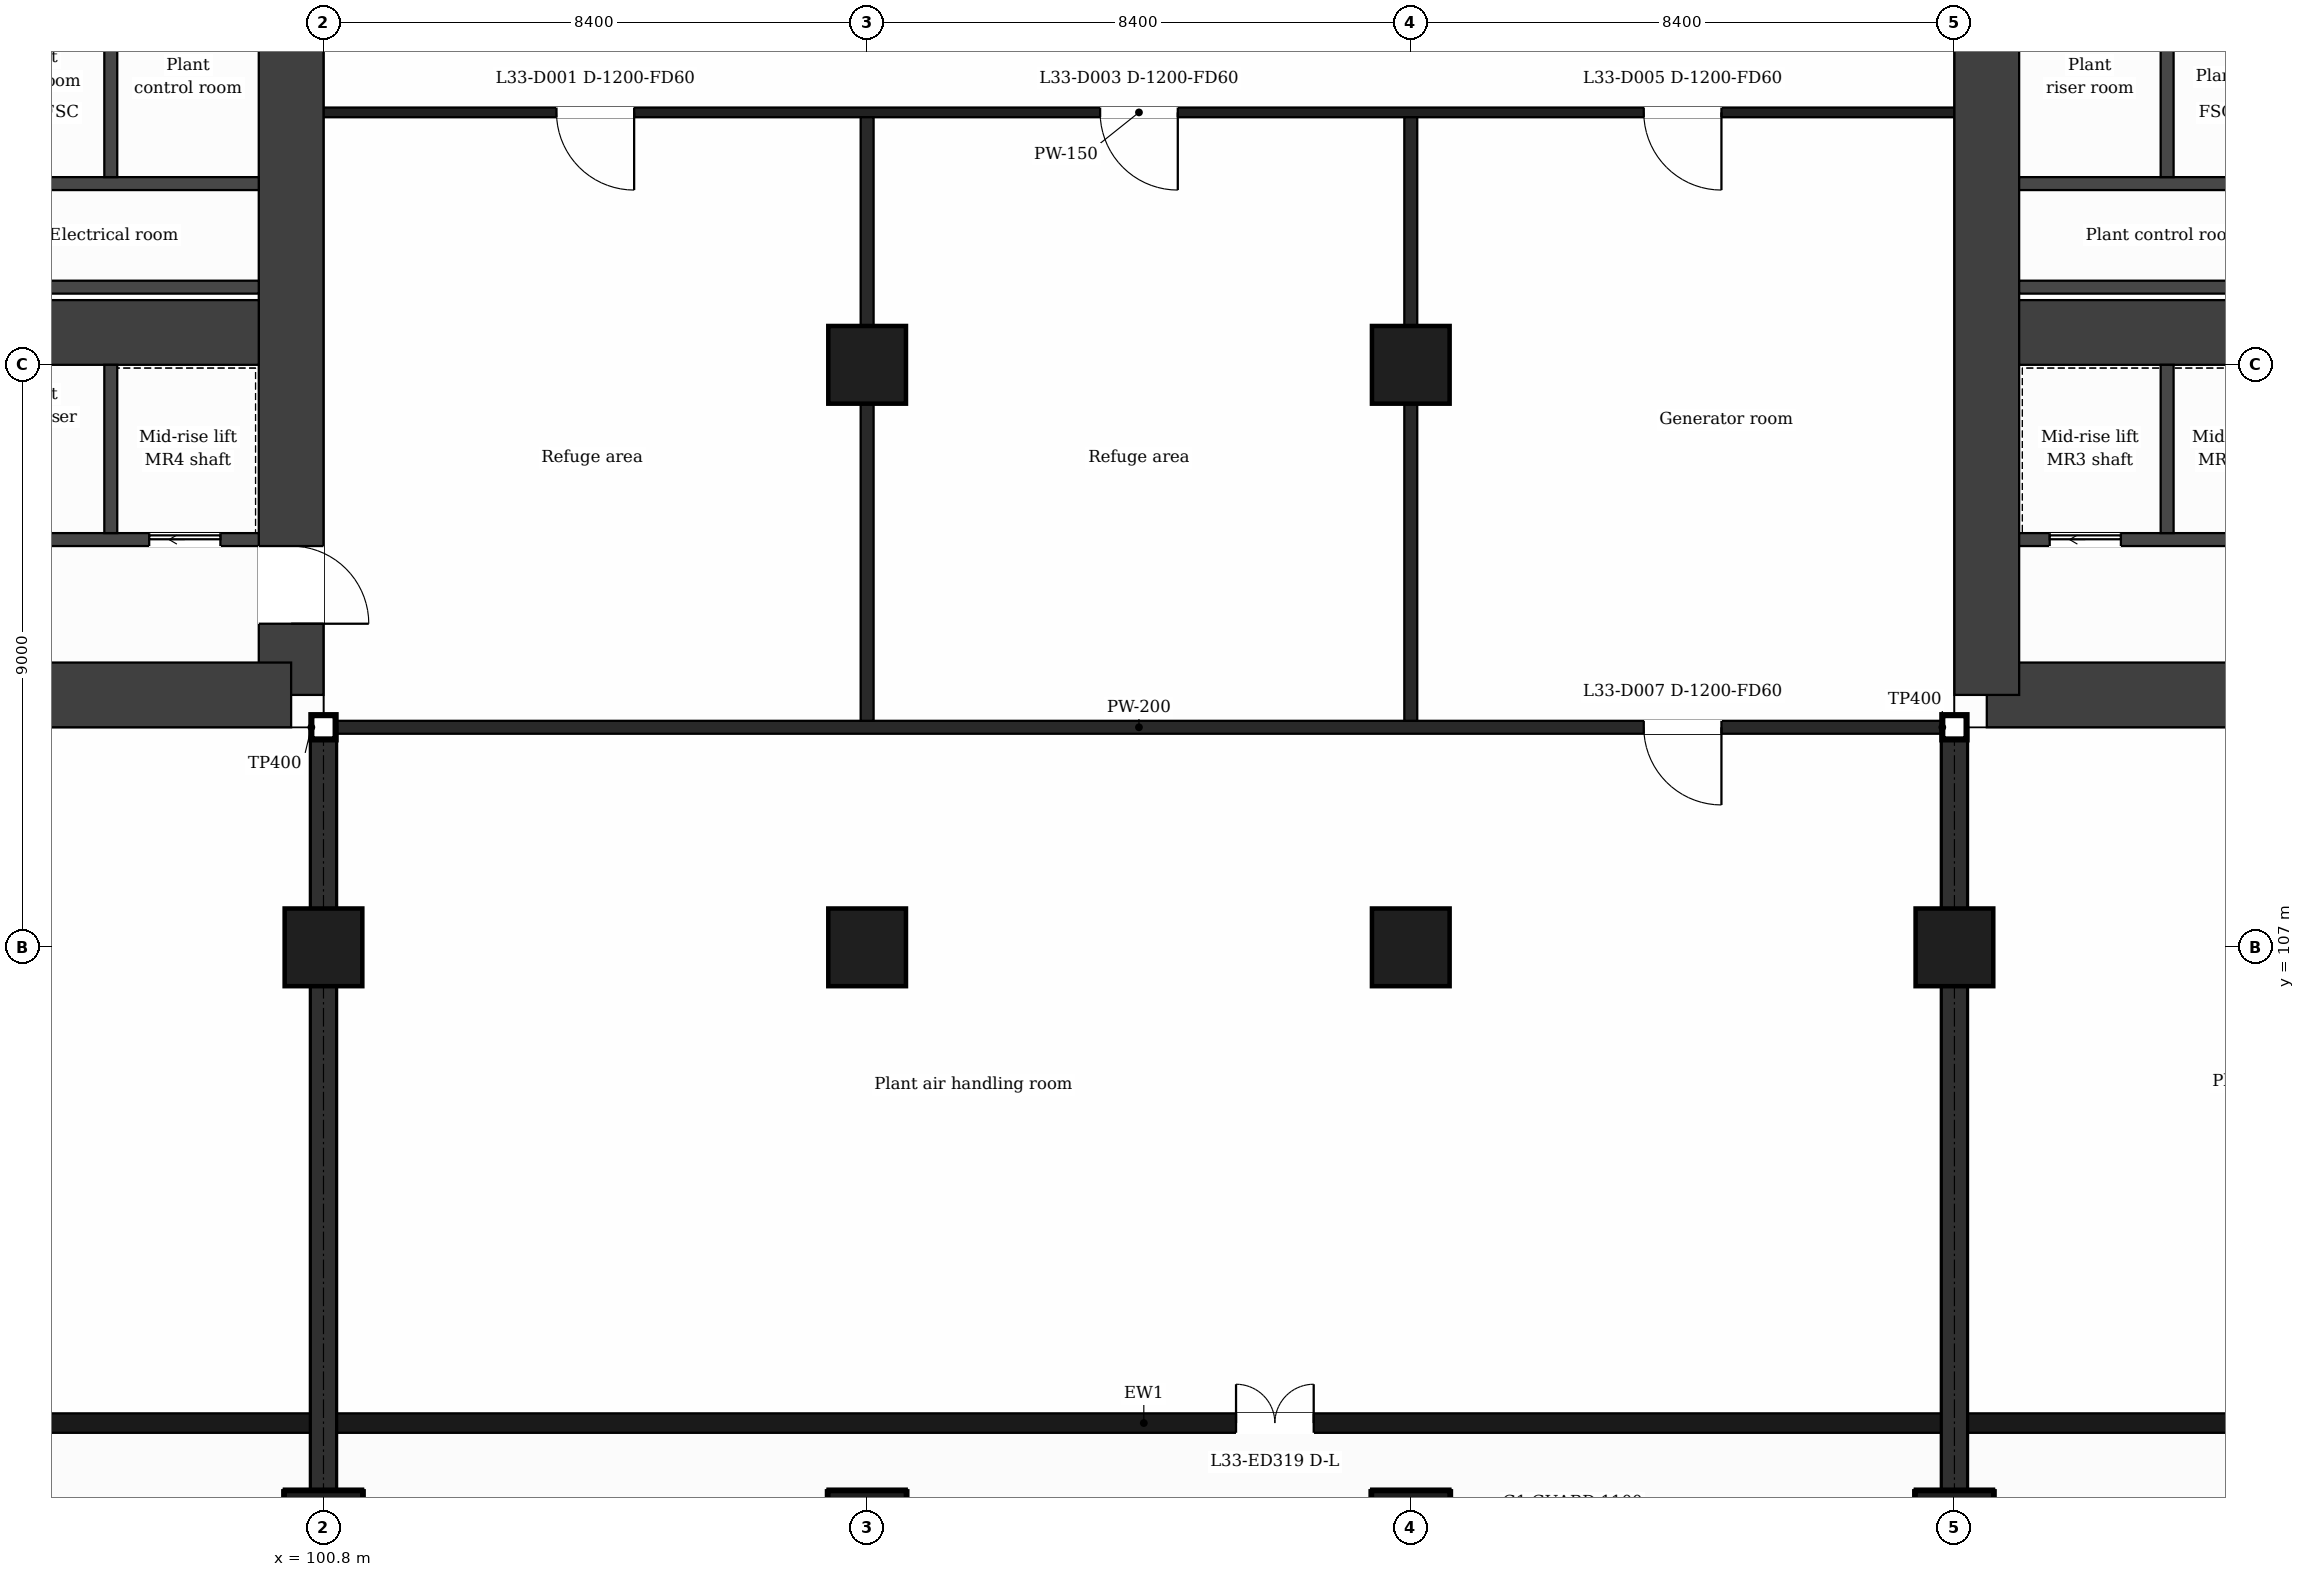
"""IFC4 building model, lengths in metres.
Left out: names, types, materials, properties, quantities, classifications, styles, units other than length and angle.
Written with IfcOpenShell. Run it as: python <this file> out.ifc"""

import sys

from ifc_helpers import new_model, si_unit, direction, frame, frame_2d, origin, origin_2d, place, context, subcontext, project, spatial, rectangle, extrude, element, fill, save


model = new_model("IFC4")
c1 = context("Model", 3, precision=1e-05, world=origin(), true_north=direction((0.0, 1.0)))
c2 = subcontext(c1, "Body", "Model", "MODEL_VIEW")
j1 = project(units=[si_unit("LENGTHUNIT", "METRE"), si_unit("PLANEANGLEUNIT", "RADIAN")], contexts=[c1])
p1 = place(None, origin())
s1 = spatial("IfcSite", under=j1, at=p1, CompositionType="ELEMENT")
p2 = place(p1, origin())
s2 = spatial("IfcBuilding", under=s1, at=p2, CompositionType="ELEMENT")
p3 = place(p2, frame((0.0, 0.0, 142.8)))
s3 = spatial("IfcBuildingStorey", under=s2, at=p3, CompositionType="ELEMENT", Elevation=142.8)
p4 = place(p3, frame((100.3, 131.9, 0.0), z_axis=(0.0, 0.0, 1.0), x_axis=(0.0, -1.0, 0.0)))
e1 = element("IfcWall", 1, at=p4, inside=s3, PredefinedType="SHEAR", context=c2, shape_type="SweptSolid", body=[
    extrude(rectangle(XDim=21.0, YDim=1.0, at=frame_2d((10.5, 0.0))), origin(), (0.0, 0.0, 1.0), 5.0),
])
p5 = place(p4, frame((18.7, 0.0, 0.0)))
e2 = element("IfcOpeningElement", 2, at=p5, cuts=e1, PredefinedType="OPENING", context=c2, shape_type="SweptSolid", body=[
    extrude(rectangle(XDim=1.2, YDim=2.1, at=frame_2d((0.6, 1.05))), frame((0.0, 0.51, 0.0), z_axis=(0.0, -1.0, 0.0), x_axis=(1.0, 0.0, 0.0)), (0.0, 0.0, 1.0), 1.02),
])
p6 = place(p4, frame((7.75, 0.0, 0.0)))
e3 = element("IfcOpeningElement", 3, at=p6, cuts=e1, PredefinedType="OPENING", context=c2, shape_type="SweptSolid", body=[
    extrude(rectangle(XDim=1.4, YDim=2.1, at=frame_2d((0.7, 1.05))), frame((0.0, 0.51, 0.0), z_axis=(0.0, -1.0, 0.0), x_axis=(1.0, 0.0, 0.0)), (0.0, 0.0, 1.0), 1.02),
])
p7 = place(p3, frame((100.3, 110.9, 0.0), z_axis=(0.0, 0.0, 1.0), x_axis=(-1.0, 0.0, 0.0)))
e4 = element("IfcWall", 4, at=p7, inside=s3, PredefinedType="SHEAR", context=c2, shape_type="SweptSolid", body=[
    extrude(rectangle(XDim=14.059, YDim=1.0, at=frame_2d((7.03, 0.0))), origin(), (0.0, 0.0, 1.0), 5.0),
])
p8 = place(p7, frame((5.802, 0.0, 0.0)))
e5 = element("IfcOpeningElement", 5, at=p8, cuts=e4, PredefinedType="OPENING", context=c2, shape_type="SweptSolid", body=[
    extrude(rectangle(XDim=1.4, YDim=2.1, at=frame_2d((0.7, 1.05))), frame((0.0, 0.51, 0.0), z_axis=(0.0, -1.0, 0.0), x_axis=(1.0, 0.0, 0.0)), (0.0, 0.0, 1.0), 1.02),
])
p9 = place(p3, frame((94.9, 116.5, 0.0), z_axis=(0.0, 0.0, 1.0), x_axis=(1.0, 0.0, 0.0)))
e6 = element("IfcWall", 6, at=p9, inside=s3, PredefinedType="SHEAR", context=c2, shape_type="SweptSolid", body=[
    extrude(rectangle(XDim=4.9, YDim=1.0, at=frame_2d((2.45, 0.0))), origin(), (0.0, 0.0, 1.0), 5.0),
])
p10 = place(p3, frame((140.559, 110.9, 0.0), z_axis=(0.0, 0.0, 1.0), x_axis=(-1.0, 0.0, 0.0)))
e7 = element("IfcWall", 7, at=p10, inside=s3, PredefinedType="SHEAR", context=c2, shape_type="SweptSolid", body=[
    extrude(rectangle(XDim=14.059, YDim=1.0, at=frame_2d((7.029, 0.0))), origin(), (0.0, 0.0, 1.0), 5.0),
])
p11 = place(p10, frame((6.858, 0.0, 0.0)))
e8 = element("IfcOpeningElement", 8, at=p11, cuts=e7, PredefinedType="OPENING", context=c2, shape_type="SweptSolid", body=[
    extrude(rectangle(XDim=1.4, YDim=2.1, at=frame_2d((0.7, 1.05))), frame((0.0, 0.51, 0.0), z_axis=(0.0, -1.0, 0.0), x_axis=(1.0, 0.0, 0.0)), (0.0, 0.0, 1.0), 1.02),
])
p12 = place(p3, frame((126.5, 110.9, 0.0), z_axis=(0.0, 0.0, 1.0), x_axis=(0.0, 1.0, 0.0)))
e9 = element("IfcWall", 9, at=p12, inside=s3, PredefinedType="SHEAR", context=c2, shape_type="SweptSolid", body=[
    extrude(rectangle(XDim=21.0, YDim=1.0, at=frame_2d((10.5, 0.0))), origin(), (0.0, 0.0, 1.0), 5.0),
])
p13 = place(p12, frame((17.5, 0.0, 0.0)))
e10 = element("IfcOpeningElement", 10, at=p13, cuts=e9, PredefinedType="OPENING", context=c2, shape_type="SweptSolid", body=[
    extrude(rectangle(XDim=1.2, YDim=2.1, at=frame_2d((0.6, 1.05))), frame((0.0, 0.51, 0.0), z_axis=(0.0, -1.0, 0.0), x_axis=(1.0, 0.0, 0.0)), (0.0, 0.0, 1.0), 1.02),
])
p14 = place(p12, frame((11.85, 0.0, 0.0)))
e11 = element("IfcOpeningElement", 11, at=p14, cuts=e9, PredefinedType="OPENING", context=c2, shape_type="SweptSolid", body=[
    extrude(rectangle(XDim=1.4, YDim=2.1, at=frame_2d((0.7, 1.05))), frame((0.0, 0.51, 0.0), z_axis=(0.0, -1.0, 0.0), x_axis=(1.0, 0.0, 0.0)), (0.0, 0.0, 1.0), 1.02),
])
p15 = place(p3, frame((127.0, 116.5, 0.0), z_axis=(0.0, 0.0, 1.0), x_axis=(1.0, 0.0, 0.0)))
e12 = element("IfcWall", 12, at=p15, inside=s3, PredefinedType="SHEAR", context=c2, shape_type="SweptSolid", body=[
    extrude(rectangle(XDim=4.9, YDim=1.0, at=frame_2d((2.45, 0.0))), origin(), (0.0, 0.0, 1.0), 5.0),
])
for number, where, z_axis, x_axis in (
    (13, (100.8, 98.0, 0.0), (0.0, 0.0, 1.0), (1.0, 0.0, 0.0)),
    (14, (109.2, 98.0, 0.0), (0.0, 0.0, 1.0), (1.0, 0.0, 0.0)),
    (15, (117.6, 98.0, 0.0), (0.0, 0.0, 1.0), (1.0, 0.0, 0.0)),
    (16, (126.0, 98.0, 0.0), (0.0, 0.0, 1.0), (1.0, 0.0, 0.0)),
    (17, (100.8, 107.0, 0.0), (0.0, 0.0, 1.0), (1.0, 0.0, 0.0)),
    (18, (109.2, 107.0, 0.0), (0.0, 0.0, 1.0), (1.0, 0.0, 0.0)),
    (19, (117.6, 107.0, 0.0), (0.0, 0.0, 1.0), (1.0, 0.0, 0.0)),
    (20, (126.0, 107.0, 0.0), (0.0, 0.0, 1.0), (1.0, 0.0, 0.0)),
    (21, (109.2, 116.0, 0.0), (0.0, 0.0, 1.0), (1.0, 0.0, 0.0)),
    (22, (117.6, 116.0, 0.0), (0.0, 0.0, 1.0), (1.0, 0.0, 0.0)),
):
    element("IfcColumn", number, at=place(p3, frame(where, z_axis=z_axis, x_axis=x_axis)), inside=s3, PredefinedType="COLUMN", context=c2, shape_type="SweptSolid", body=[
        extrude(rectangle(XDim=1.2, YDim=1.2, at=origin_2d()), origin(), (0.0, 0.0, 1.0), 5.0),
    ])
p16 = place(p3, frame((89.85, 99.65, 0.0), z_axis=(0.0, 0.0, 1.0), x_axis=(1.0, 0.0, 0.0)))
e23 = element("IfcWall", 23, at=p16, inside=s3, PredefinedType="SOLIDWALL", context=c2, shape_type="SweptSolid", body=[
    extrude(rectangle(XDim=47.25, YDim=0.3, at=frame_2d((23.625, 0.0))), origin(), (0.0, 0.0, 1.0), 4.68),
])
p17 = place(p16, frame((25.05, 0.0, 0.0)))
e24 = element("IfcOpeningElement", 24, at=p17, cuts=e23, PredefinedType="OPENING", context=c2, shape_type="SweptSolid", body=[
    extrude(rectangle(XDim=1.2, YDim=2.4, at=frame_2d((0.6, 1.2))), frame((0.0, 0.16, 0.0), z_axis=(0.0, -1.0, 0.0), x_axis=(1.0, 0.0, 0.0)), (0.0, 0.0, 1.0), 0.32),
])
p18 = place(p3, frame((100.7, 110.4, 0.0), z_axis=(0.0, 0.0, 1.0), x_axis=(1.0, 0.0, 0.0)))
e25 = element("IfcWall", 25, at=p18, inside=s3, PredefinedType="PARTITIONING", context=c2, shape_type="SweptSolid", body=[
    extrude(rectangle(XDim=25.4, YDim=0.2, at=frame_2d((12.7, 0.0))), origin(), (0.0, 0.0, 1.0), 4.68),
])
p19 = place(p18, frame((20.5, 0.0, 0.0)))
e26 = element("IfcOpeningElement", 26, at=p19, cuts=e25, PredefinedType="OPENING", context=c2, shape_type="SweptSolid", body=[
    extrude(rectangle(XDim=1.2, YDim=2.1, at=frame_2d((0.6, 1.05))), frame((0.0, 0.11, 0.0), z_axis=(0.0, -1.0, 0.0), x_axis=(1.0, 0.0, 0.0)), (0.0, 0.0, 1.0), 0.22),
])
p20 = place(p3, frame((95.127, 113.3, 0.0), z_axis=(0.0, 0.0, 1.0), x_axis=(1.0, 0.0, 0.0)))
e27 = element("IfcWall", 27, at=p20, inside=s3, PredefinedType="PARTITIONING", context=c2, shape_type="SweptSolid", body=[
    extrude(rectangle(XDim=4.673, YDim=0.2, at=frame_2d((2.336, 0.0))), origin(), (0.0, 0.0, 1.0), 4.68),
])
p21 = place(p20, frame((2.98, 0.0, 0.0)))
e28 = element("IfcOpeningElement", 28, at=p21, cuts=e27, PredefinedType="OPENING", context=c2, shape_type="SweptSolid", body=[
    extrude(rectangle(XDim=1.1, YDim=2.1, at=frame_2d((0.55, 1.05))), frame((0.0, 0.11, 0.0), z_axis=(0.0, -1.0, 0.0), x_axis=(1.0, 0.0, 0.0)), (0.0, 0.0, 1.0), 0.22),
])
p22 = place(p3, frame((127.0, 113.3, 0.0), z_axis=(0.0, 0.0, 1.0), x_axis=(1.0, 0.0, 0.0)))
e29 = element("IfcWall", 29, at=p22, inside=s3, PredefinedType="PARTITIONING", context=c2, shape_type="SweptSolid", body=[
    extrude(rectangle(XDim=4.673, YDim=0.2, at=frame_2d((2.336, 0.0))), origin(), (0.0, 0.0, 1.0), 4.68),
])
p23 = place(p22, frame((0.472, 0.0, 0.0)))
e30 = element("IfcOpeningElement", 30, at=p23, cuts=e29, PredefinedType="OPENING", context=c2, shape_type="SweptSolid", body=[
    extrude(rectangle(XDim=1.1, YDim=2.1, at=frame_2d((0.55, 1.05))), frame((0.0, 0.11, 0.0), z_axis=(0.0, -1.0, 0.0), x_axis=(1.0, 0.0, 0.0)), (0.0, 0.0, 1.0), 0.22),
])
for number, where, z_axis, x_axis in (
    (31, (95.227, 117.2, 0.0), (0.0, 0.0, 1.0), (1.0, 0.0, 0.0)),
    (32, (127.0, 117.2, 0.0), (0.0, 0.0, 1.0), (1.0, 0.0, 0.0)),
    (33, (95.227, 118.8, 0.0), (0.0, 0.0, 1.0), (1.0, 0.0, 0.0)),
    (34, (127.0, 118.8, 0.0), (0.0, 0.0, 1.0), (1.0, 0.0, 0.0)),
):
    element("IfcWall", number, at=place(p3, frame(where, z_axis=z_axis, x_axis=x_axis)), inside=s3, PredefinedType="PARTITIONING", context=c2, shape_type="SweptSolid", body=[
        extrude(rectangle(XDim=4.573, YDim=0.2, at=frame_2d((2.287, 0.0))), origin(), (0.0, 0.0, 1.0), 4.68),
    ])
p24 = place(p3, frame((100.8, 119.9, 0.0), z_axis=(0.0, 0.0, 1.0), x_axis=(1.0, 0.0, 0.0)))
e35 = element("IfcWall", 35, at=p24, inside=s3, PredefinedType="PARTITIONING", context=c2, shape_type="SweptSolid", body=[
    extrude(rectangle(XDim=25.2, YDim=0.15, at=frame_2d((12.6, 0.0))), origin(), (0.0, 0.0, 1.0), 4.68),
])
p25 = place(p24, frame((3.6, 0.0, 0.0)))
e36 = element("IfcOpeningElement", 36, at=p25, cuts=e35, PredefinedType="OPENING", context=c2, shape_type="SweptSolid", body=[
    extrude(rectangle(XDim=1.2, YDim=2.1, at=frame_2d((0.6, 1.05))), frame((0.0, 0.085, 0.0), z_axis=(0.0, -1.0, 0.0), x_axis=(1.0, 0.0, 0.0)), (0.0, 0.0, 1.0), 0.17),
])
p26 = place(p24, frame((12.0, 0.0, 0.0)))
e37 = element("IfcOpeningElement", 37, at=p26, cuts=e35, PredefinedType="OPENING", context=c2, shape_type="SweptSolid", body=[
    extrude(rectangle(XDim=1.2, YDim=2.1, at=frame_2d((0.6, 1.05))), frame((0.0, 0.085, 0.0), z_axis=(0.0, -1.0, 0.0), x_axis=(1.0, 0.0, 0.0)), (0.0, 0.0, 1.0), 0.17),
])
p27 = place(p24, frame((20.4, 0.0, 0.0)))
e38 = element("IfcOpeningElement", 38, at=p27, cuts=e35, PredefinedType="OPENING", context=c2, shape_type="SweptSolid", body=[
    extrude(rectangle(XDim=1.2, YDim=2.1, at=frame_2d((0.6, 1.05))), frame((0.0, 0.085, 0.0), z_axis=(0.0, -1.0, 0.0), x_axis=(1.0, 0.0, 0.0)), (0.0, 0.0, 1.0), 0.17),
])
p28 = place(p3, frame((97.513, 113.4, 0.0), z_axis=(0.0, 0.0, 1.0), x_axis=(0.0, 1.0, 0.0)))
e39 = element("IfcWall", 39, at=p28, inside=s3, PredefinedType="PARTITIONING", context=c2, shape_type="SweptSolid", body=[
    extrude(rectangle(XDim=2.6, YDim=0.2, at=frame_2d((1.3, 0.0))), origin(), (0.0, 0.0, 1.0), 4.68),
])
p29 = place(p3, frame((97.513, 118.9, 0.0), z_axis=(0.0, 0.0, 1.0), x_axis=(0.0, 1.0, 0.0)))
e40 = element("IfcWall", 40, at=p29, inside=s3, PredefinedType="PARTITIONING", context=c2, shape_type="SweptSolid", body=[
    extrude(rectangle(XDim=3.1, YDim=0.2, at=frame_2d((1.55, 0.0))), origin(), (0.0, 0.0, 1.0), 4.68),
])
p30 = place(p3, frame((100.8, 99.79, 0.0), z_axis=(0.0, 0.0, 1.0), x_axis=(0.0, 1.0, 0.0)))
e41 = element("IfcWall", 41, at=p30, inside=s3, PredefinedType="PARTITIONING", context=c2, shape_type="SweptSolid", body=[
    extrude(rectangle(XDim=10.51, YDim=0.2, at=frame_2d((5.255, 0.0))), origin(), (0.0, 0.0, 1.0), 4.68),
])
for number, where, z_axis, x_axis in (
    (42, (109.2, 110.5, 0.0), (0.0, 0.0, 1.0), (0.0, 1.0, 0.0)),
    (43, (117.6, 110.5, 0.0), (0.0, 0.0, 1.0), (0.0, 1.0, 0.0)),
):
    element("IfcWall", number, at=place(p3, frame(where, z_axis=z_axis, x_axis=x_axis)), inside=s3, PredefinedType="PARTITIONING", context=c2, shape_type="SweptSolid", body=[
        extrude(rectangle(XDim=9.325, YDim=0.2, at=frame_2d((4.663, 0.0))), origin(), (0.0, 0.0, 1.0), 4.68),
    ])
p31 = place(p3, frame((126.0, 99.79, 0.0), z_axis=(0.0, 0.0, 1.0), x_axis=(0.0, 1.0, 0.0)))
e44 = element("IfcWall", 44, at=p31, inside=s3, PredefinedType="PARTITIONING", context=c2, shape_type="SweptSolid", body=[
    extrude(rectangle(XDim=10.51, YDim=0.2, at=frame_2d((5.255, 0.0))), origin(), (0.0, 0.0, 1.0), 4.68),
])
p32 = place(p3, frame((129.287, 113.4, 0.0), z_axis=(0.0, 0.0, 1.0), x_axis=(0.0, 1.0, 0.0)))
e45 = element("IfcWall", 45, at=p32, inside=s3, PredefinedType="PARTITIONING", context=c2, shape_type="SweptSolid", body=[
    extrude(rectangle(XDim=2.6, YDim=0.2, at=frame_2d((1.3, 0.0))), origin(), (0.0, 0.0, 1.0), 4.68),
])
p33 = place(p3, frame((129.287, 118.9, 0.0), z_axis=(0.0, 0.0, 1.0), x_axis=(0.0, 1.0, 0.0)))
e46 = element("IfcWall", 46, at=p33, inside=s3, PredefinedType="PARTITIONING", context=c2, shape_type="SweptSolid", body=[
    extrude(rectangle(XDim=3.1, YDim=0.2, at=frame_2d((1.55, 0.0))), origin(), (0.0, 0.0, 1.0), 4.68),
])
p34 = place(p17, origin())
e47 = element("IfcDoor", 47, at=p34, inside=s3, OperationType="DOUBLE_DOOR_SINGLE_SWING", PredefinedType="DOOR", context=c2, shape_type="SweptSolid", body=[
    extrude(rectangle(XDim=1.2, YDim=2.4, at=frame_2d((0.6, 1.2))), frame((0.0, 0.025, 0.0), z_axis=(0.0, -1.0, 0.0), x_axis=(1.0, 0.0, 0.0)), (0.0, 0.0, 1.0), 0.05),
])
fill(e24, e47)
p35 = place(p25, origin())
e48 = element("IfcDoor", 48, at=p35, inside=s3, OperationType="SINGLE_SWING_RIGHT", PredefinedType="DOOR", context=c2, shape_type="SweptSolid", body=[
    extrude(rectangle(XDim=1.2, YDim=2.1, at=frame_2d((0.6, 1.05))), frame((0.0, 0.025, 0.0), z_axis=(0.0, -1.0, 0.0), x_axis=(1.0, 0.0, 0.0)), (0.0, 0.0, 1.0), 0.05),
])
fill(e36, e48)
p36 = place(p26, origin())
e49 = element("IfcDoor", 49, at=p36, inside=s3, OperationType="SINGLE_SWING_RIGHT", PredefinedType="DOOR", context=c2, shape_type="SweptSolid", body=[
    extrude(rectangle(XDim=1.2, YDim=2.1, at=frame_2d((0.6, 1.05))), frame((0.0, 0.025, 0.0), z_axis=(0.0, -1.0, 0.0), x_axis=(1.0, 0.0, 0.0)), (0.0, 0.0, 1.0), 0.05),
])
fill(e37, e49)
p37 = place(p27, origin())
e50 = element("IfcDoor", 50, at=p37, inside=s3, OperationType="SINGLE_SWING_RIGHT", PredefinedType="DOOR", context=c2, shape_type="SweptSolid", body=[
    extrude(rectangle(XDim=1.2, YDim=2.1, at=frame_2d((0.6, 1.05))), frame((0.0, 0.025, 0.0), z_axis=(0.0, -1.0, 0.0), x_axis=(1.0, 0.0, 0.0)), (0.0, 0.0, 1.0), 0.05),
])
fill(e38, e50)
p38 = place(p19, origin())
e51 = element("IfcDoor", 51, at=p38, inside=s3, OperationType="SINGLE_SWING_RIGHT", PredefinedType="DOOR", context=c2, shape_type="SweptSolid", body=[
    extrude(rectangle(XDim=1.2, YDim=2.1, at=frame_2d((0.6, 1.05))), frame((0.0, 0.025, 0.0), z_axis=(0.0, -1.0, 0.0), x_axis=(1.0, 0.0, 0.0)), (0.0, 0.0, 1.0), 0.05),
])
fill(e26, e51)
p39 = place(p21, origin())
e52 = element("IfcDoor", 52, at=p39, inside=s3, OperationType="SLIDING_TO_LEFT", PredefinedType="DOOR", context=c2, shape_type="SweptSolid", body=[
    extrude(rectangle(XDim=1.1, YDim=2.1, at=frame_2d((0.55, 1.05))), frame((0.0, 0.025, 0.0), z_axis=(0.0, -1.0, 0.0), x_axis=(1.0, 0.0, 0.0)), (0.0, 0.0, 1.0), 0.05),
])
fill(e28, e52)
p40 = place(p23, origin())
e53 = element("IfcDoor", 53, at=p40, inside=s3, OperationType="SLIDING_TO_LEFT", PredefinedType="DOOR", context=c2, shape_type="SweptSolid", body=[
    extrude(rectangle(XDim=1.1, YDim=2.1, at=frame_2d((0.55, 1.05))), frame((0.0, 0.025, 0.0), z_axis=(0.0, -1.0, 0.0), x_axis=(1.0, 0.0, 0.0)), (0.0, 0.0, 1.0), 0.05),
])
fill(e30, e53)
p41 = place(p5, origin())
e54 = element("IfcDoor", 54, at=p41, inside=s3, OperationType="SINGLE_SWING_RIGHT", PredefinedType="DOOR", context=c2, shape_type="SweptSolid", body=[
    extrude(rectangle(XDim=1.2, YDim=2.1, at=frame_2d((0.6, 1.05))), frame((0.0, 0.025, 0.0), z_axis=(0.0, -1.0, 0.0), x_axis=(1.0, 0.0, 0.0)), (0.0, 0.0, 1.0), 0.05),
])
fill(e2, e54)
save(model, sys.argv[1])
